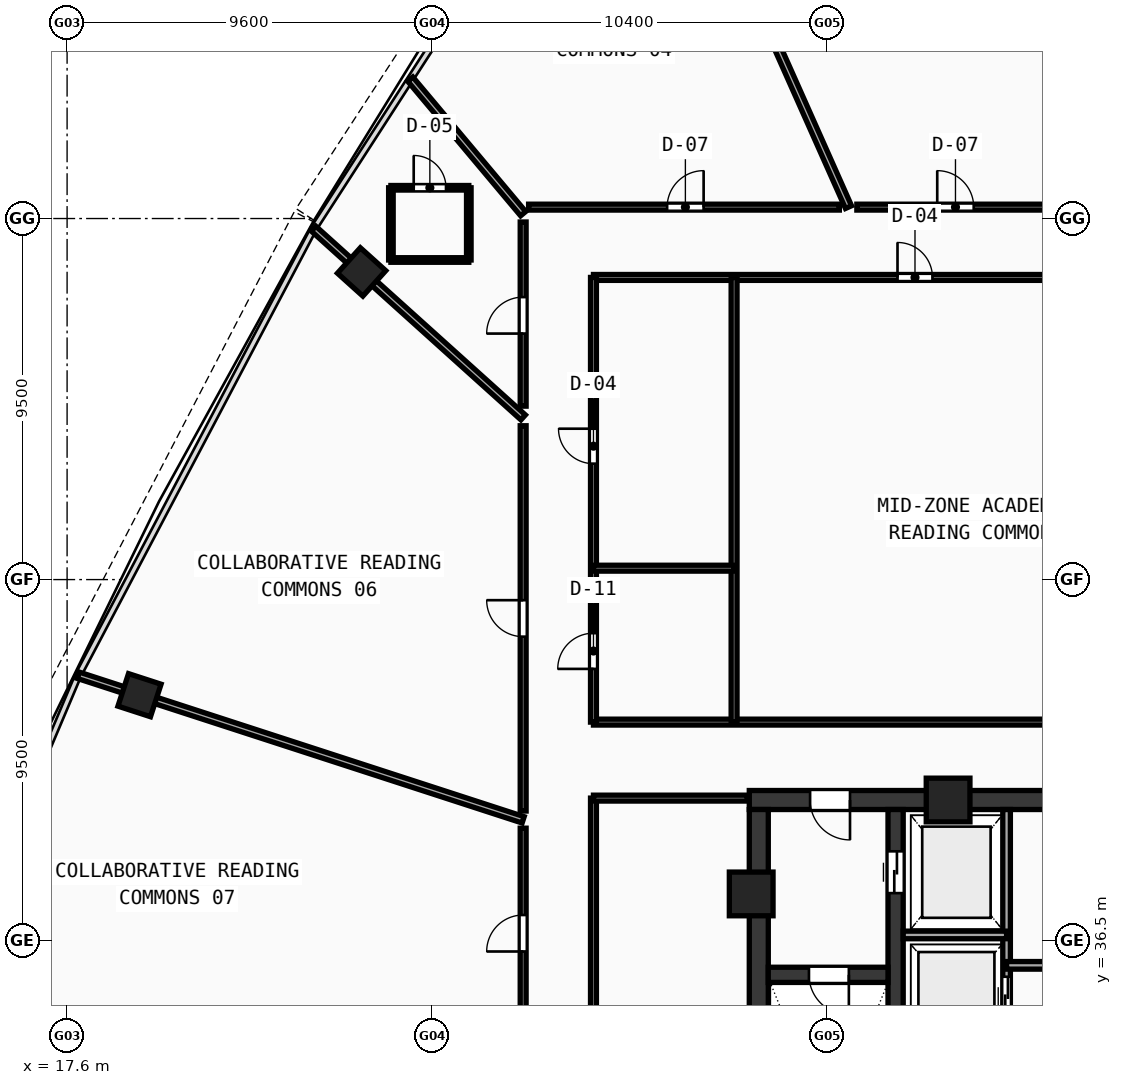
"""IFC4 building model, lengths in metres.
Left out: names, types, materials, properties, quantities, classifications, styles, units other than length and angle.
Written with IfcOpenShell. Run it as: python <this file> out.ifc"""

import sys

from ifc_helpers import new_model, si_unit, direction, frame, frame_2d, origin, origin_with_axes, origin_2d, place, context, subcontext, project, spatial, rectangle, hollow_rectangle, extrude, source, transform, mapped, element, fill, save


model = new_model("IFC4")
c1 = context("Model", 3, precision=1e-05, world=origin(), true_north=direction((0.0, 1.0)))
c2 = subcontext(c1, "Body", "Model", "MODEL_VIEW")
j1 = project(units=[si_unit("LENGTHUNIT", "METRE"), si_unit("PLANEANGLEUNIT", "RADIAN")], contexts=[c1])
p1 = place(None, origin())
s1 = spatial("IfcSite", under=j1, at=p1, CompositionType="ELEMENT")
p2 = place(p1, origin())
s2 = spatial("IfcBuilding", under=s1, at=p2, CompositionType="ELEMENT")
p3 = place(p2, frame((0.0, 0.0, 203.76)))
s3 = spatial("IfcBuildingStorey", under=s2, at=p3, CompositionType="ELEMENT", Elevation=203.76)
p4 = place(p3, frame((35.55, 40.2, 0.0), z_axis=(0.0, 0.0, 1.0), x_axis=(1.0, 0.0, 0.0)))
e1 = element("IfcWall", 1, at=p4, inside=s3, PredefinedType="SHEAR", context=c2, shape_type="SweptSolid", body=[
    extrude(rectangle(XDim=11.25, YDim=0.5, at=frame_2d((5.625, 0.0))), origin(), (0.0, 0.0, 1.0), 3.54),
])
p5 = place(p4, frame((1.6, 0.0, 0.0)))
e2 = element("IfcOpeningElement", 2, at=p5, cuts=e1, PredefinedType="OPENING", context=c2, shape_type="SweptSolid", body=[
    extrude(rectangle(XDim=1.05, YDim=2.1, at=frame_2d((0.525, 1.05))), frame((0.0, 0.26, 0.0), z_axis=(0.0, -1.0, 0.0), x_axis=(1.0, 0.0, 0.0)), (0.0, 0.0, 1.0), 0.52),
])
p6 = place(p3, frame((35.8, 27.75, 0.0), z_axis=(0.0, 0.0, 1.0), x_axis=(0.0, 1.0, 0.0)))
e3 = element("IfcWall", 3, at=p6, inside=s3, PredefinedType="SHEAR", context=c2, shape_type="SweptSolid", body=[
    extrude(rectangle(XDim=12.2, YDim=0.5, at=frame_2d((6.1, 0.0))), origin(), (0.0, 0.0, 1.0), 3.54),
])
p7 = place(p3, frame((39.4, 27.75, 0.0), z_axis=(0.0, 0.0, 1.0), x_axis=(0.0, 1.0, 0.0)))
e4 = element("IfcWall", 4, at=p7, inside=s3, PredefinedType="SHEAR", context=c2, shape_type="SweptSolid", body=[
    extrude(rectangle(XDim=12.2, YDim=0.4, at=frame_2d((6.1, 0.0))), origin(), (0.0, 0.0, 1.0), 3.54),
])
p8 = place(p7, frame((10.0, 0.0, 0.0)))
e5 = element("IfcOpeningElement", 5, at=p8, cuts=e4, PredefinedType="OPENING", context=c2, shape_type="SweptSolid", body=[
    extrude(rectangle(XDim=1.1, YDim=2.1, at=frame_2d((0.55, 1.05))), frame((0.0, 0.21, 0.0), z_axis=(0.0, -1.0, 0.0), x_axis=(1.0, 0.0, 0.0)), (0.0, 0.0, 1.0), 0.42),
])
p9 = place(p3, frame((36.05, 35.6, 0.0), z_axis=(0.0, 0.0, 1.0), x_axis=(1.0, 0.0, 0.0)))
e6 = element("IfcWall", 6, at=p9, inside=s3, PredefinedType="SHEAR", context=c2, shape_type="SweptSolid", body=[
    extrude(rectangle(XDim=3.15, YDim=0.4, at=frame_2d((1.575, 0.0))), origin(), (0.0, 0.0, 1.0), 3.54),
])
p10 = place(p9, frame((1.07, 0.0, 0.0)))
e7 = element("IfcOpeningElement", 7, at=p10, cuts=e6, PredefinedType="OPENING", context=c2, shape_type="SweptSolid", body=[
    extrude(rectangle(XDim=1.05, YDim=2.1, at=frame_2d((0.525, 1.05))), frame((0.0, 0.21, 0.0), z_axis=(0.0, -1.0, 0.0), x_axis=(1.0, 0.0, 0.0)), (0.0, 0.0, 1.0), 0.42),
])
m1 = source(origin(), c2, "Body", "SweptSolid", [
    extrude(hollow_rectangle(XDim=1.15, YDim=1.15, WallThickness=0.048, at=origin_2d()), origin(), (0.0, 0.0, 1.0), 3.8),
])
for number, where, z_axis, x_axis in (
    (8, (40.781, 40.2, -0.26), (0.0, 0.0, 1.0), (1.0, 0.0, 0.0)),
    (9, (35.6, 37.729, -0.26), (0.0, 0.0, 1.0), (1.0, 0.0, 0.0)),
):
    element("IfcColumn", number, at=place(p3, frame(where, z_axis=z_axis, x_axis=x_axis)), inside=s3, PredefinedType="COLUMN", context=c2, shape_type="MappedRepresentation", body=[
        mapped(m1, transform((0.0, 0.0, 0.0), scale=1.0)),
    ])
m2 = source(origin(), c2, "Body", "SweptSolid", [
    extrude(hollow_rectangle(XDim=0.9, YDim=0.9, WallThickness=0.036, at=origin_2d()), origin(), (0.0, 0.0, 1.0), 3.8),
])
for number, where, z_axis, x_axis in (
    (10, (25.349, 54.095, -0.26), (0.0, 0.0, 1.0), (-0.669, -0.743, 0.0)),
    (11, (19.505, 42.958, -0.26), (0.0, 0.0, 1.0), (-0.309, -0.951, 0.0)),
):
    element("IfcColumn", number, at=place(p3, frame(where, z_axis=z_axis, x_axis=x_axis)), inside=s3, PredefinedType="COLUMN", context=c2, shape_type="MappedRepresentation", body=[
        mapped(m2, transform((0.0, 0.0, 0.0), scale=1.0)),
    ])
p11 = place(p3, frame((42.32, 33.5, 0.0), z_axis=(0.0, 0.0, 1.0), x_axis=(0.0, 1.0, 0.0)))
e12 = element("IfcWall", 12, at=p11, inside=s3, PredefinedType="SOLIDWALL", context=c2, shape_type="SweptSolid", body=[
    extrude(rectangle(XDim=6.45, YDim=0.2, at=frame_2d((3.225, 0.0))), origin(), (0.0, 0.0, 1.0), 3.54),
])
p12 = place(p11, frame((1.0, 0.0, 0.0)))
e13 = element("IfcOpeningElement", 13, at=p12, cuts=e12, PredefinedType="OPENING", context=c2, shape_type="SweptSolid", body=[
    extrude(rectangle(XDim=1.05, YDim=2.1, at=frame_2d((0.525, 1.05))), frame((0.0, 0.11, 0.0), z_axis=(0.0, -1.0, 0.0), x_axis=(1.0, 0.0, 0.0)), (0.0, 0.0, 1.0), 0.22),
])
p13 = place(p3, frame((39.6, 36.65, 0.0), z_axis=(0.0, 0.0, 1.0), x_axis=(1.0, 0.0, 0.0)))
e14 = element("IfcWall", 14, at=p13, inside=s3, PredefinedType="SOLIDWALL", context=c2, shape_type="SweptSolid", body=[
    extrude(rectangle(XDim=2.72, YDim=0.2, at=frame_2d((1.36, 0.0))), origin(), (0.0, 0.0, 1.0), 3.54),
])
p14 = place(p3, frame((42.32, 35.85, 0.0), z_axis=(0.0, 0.0, 1.0), x_axis=(1.0, 0.0, 0.0)))
e15 = element("IfcWall", 15, at=p14, inside=s3, PredefinedType="SOLIDWALL", context=c2, shape_type="SweptSolid", body=[
    extrude(rectangle(XDim=4.73, YDim=0.2, at=frame_2d((2.365, 0.0))), origin(), (0.0, 0.0, 1.0), 3.54),
])
p15 = place(p14, frame((1.8, 0.0, 0.0)))
e16 = element("IfcOpeningElement", 16, at=p15, cuts=e15, PredefinedType="OPENING", context=c2, shape_type="SweptSolid", body=[
    extrude(rectangle(XDim=0.9, YDim=2.1, at=frame_2d((0.45, 1.05))), frame((0.0, 0.11, 0.0), z_axis=(0.0, -1.0, 0.0), x_axis=(1.0, 0.0, 0.0)), (0.0, 0.0, 1.0), 0.22),
])
p16 = place(p3, frame((31.45, 42.25, 0.0), z_axis=(0.0, 0.0, 1.0), x_axis=(1.0, 0.0, 0.0)))
e17 = element("IfcWall", 17, at=p16, inside=s3, PredefinedType="PARTITIONING", context=c2, shape_type="SweptSolid", body=[
    extrude(rectangle(XDim=33.1, YDim=0.155, at=frame_2d((16.55, 0.0))), origin(), (0.0, 0.0, 1.0), 2.89),
])
p17 = place(p3, frame((31.45, 53.95, 0.0), z_axis=(0.0, 0.0, 1.0), x_axis=(1.0, 0.0, 0.0)))
e18 = element("IfcWall", 18, at=p17, inside=s3, PredefinedType="PARTITIONING", context=c2, shape_type="SweptSolid", body=[
    extrude(rectangle(XDim=33.1, YDim=0.155, at=frame_2d((16.55, 0.0))), origin(), (0.0, 0.0, 1.0), 2.89),
])
p18 = place(p17, frame((8.0, 0.0, 0.0)))
e19 = element("IfcOpeningElement", 19, at=p18, cuts=e18, PredefinedType="OPENING", context=c2, shape_type="SweptSolid", body=[
    extrude(rectangle(XDim=0.92, YDim=2.1, at=frame_2d((0.46, 1.05))), frame((0.0, 0.087, 0.0), z_axis=(0.0, -1.0, 0.0), x_axis=(1.0, 0.0, 0.0)), (0.0, 0.0, 1.0), 0.175),
])
p19 = place(p17, frame((19.85, 0.0, 0.0)))
e20 = element("IfcOpeningElement", 20, at=p19, cuts=e18, PredefinedType="OPENING", context=c2, shape_type="SweptSolid", body=[
    extrude(rectangle(XDim=0.92, YDim=2.1, at=frame_2d((0.46, 1.05))), frame((0.0, 0.087, 0.0), z_axis=(0.0, -1.0, 0.0), x_axis=(1.0, 0.0, 0.0)), (0.0, 0.0, 1.0), 0.175),
])
p20 = place(p3, frame((31.45, 42.25, 0.0), z_axis=(0.0, 0.0, 1.0), x_axis=(0.0, 1.0, 0.0)))
e21 = element("IfcWall", 21, at=p20, inside=s3, PredefinedType="PARTITIONING", context=c2, shape_type="SweptSolid", body=[
    extrude(rectangle(XDim=11.7, YDim=0.155, at=frame_2d((5.85, 0.0))), origin(), (0.0, 0.0, 1.0), 2.89),
])
p21 = place(p20, frame((1.4, 0.0, 0.0)))
e22 = element("IfcOpeningElement", 22, at=p21, cuts=e21, PredefinedType="OPENING", context=c2, shape_type="SweptSolid", body=[
    extrude(rectangle(XDim=0.94, YDim=2.1, at=frame_2d((0.47, 1.05))), frame((0.0, 0.087, 0.0), z_axis=(0.0, -1.0, 0.0), x_axis=(1.0, 0.0, 0.0)), (0.0, 0.0, 1.0), 0.175),
])
p22 = place(p20, frame((6.8, 0.0, 0.0)))
e23 = element("IfcOpeningElement", 23, at=p22, cuts=e21, PredefinedType="OPENING", context=c2, shape_type="SweptSolid", body=[
    extrude(rectangle(XDim=0.92, YDim=2.1, at=frame_2d((0.46, 1.05))), frame((0.0, 0.087, 0.0), z_axis=(0.0, -1.0, 0.0), x_axis=(1.0, 0.0, 0.0)), (0.0, 0.0, 1.0), 0.175),
])
p23 = place(p3, frame((35.15, 42.25, 0.0), z_axis=(0.0, 0.0, 1.0), x_axis=(0.0, 1.0, 0.0)))
e24 = element("IfcWall", 24, at=p23, inside=s3, PredefinedType="PARTITIONING", context=c2, shape_type="SweptSolid", body=[
    extrude(rectangle(XDim=11.7, YDim=0.155, at=frame_2d((5.85, 0.0))), origin(), (0.0, 0.0, 1.0), 2.89),
])
p24 = place(p3, frame((31.45, 46.3, 0.0), z_axis=(0.0, 0.0, 1.0), x_axis=(1.0, 0.0, 0.0)))
e25 = element("IfcWall", 25, at=p24, inside=s3, PredefinedType="PARTITIONING", context=c2, shape_type="SweptSolid", body=[
    extrude(rectangle(XDim=3.7, YDim=0.155, at=frame_2d((1.85, 0.0))), origin(), (0.0, 0.0, 1.0), 2.89),
])
p25 = place(p3, frame((31.45, 23.65, 0.0), z_axis=(0.0, 0.0, 1.0), x_axis=(0.0, 1.0, 0.0)))
e26 = element("IfcWall", 26, at=p25, inside=s3, PredefinedType="PARTITIONING", context=c2, shape_type="SweptSolid", body=[
    extrude(rectangle(XDim=16.6, YDim=0.155, at=frame_2d((8.3, 0.0))), origin(), (0.0, 0.0, 1.0), 2.89),
])
p26 = place(p25, frame((7.5, 0.0, 0.0)))
e27 = element("IfcOpeningElement", 27, at=p26, cuts=e26, PredefinedType="OPENING", context=c2, shape_type="SweptSolid", body=[
    extrude(rectangle(XDim=0.9, YDim=2.08, at=frame_2d((0.45, 1.04))), frame((0.0, 0.087, 0.0), z_axis=(0.0, -1.0, 0.0), x_axis=(1.0, 0.0, 0.0)), (0.0, 0.0, 1.0), 0.175),
])
p27 = place(p3, frame((31.45, 40.25, 0.0), z_axis=(0.0, 0.0, 1.0), x_axis=(1.0, 0.0, 0.0)))
e28 = element("IfcWall", 28, at=p27, inside=s3, PredefinedType="PARTITIONING", context=c2, shape_type="SweptSolid", body=[
    extrude(rectangle(XDim=4.05, YDim=0.155, at=frame_2d((2.025, 0.0))), origin(), (0.0, 0.0, 1.0), 3.54),
])
p28 = place(p3, frame((38.16, 55.8, 0.0), z_axis=(0.0, 0.0, 1.0), x_axis=(-0.406733161266, 0.913547007836, 0.0)))
e29 = element("IfcWall", 29, at=p28, inside=s3, PredefinedType="PARTITIONING", context=c2, shape_type="SweptSolid", body=[
    extrude(rectangle(XDim=13.749, YDim=0.175, at=frame_2d((6.875, 0.0))), origin(), (0.0, 0.0, 1.0), 2.89),
])
p29 = place(p3, frame((29.6, 55.628, 0.0), z_axis=(0.0, 0.0, 1.0), x_axis=(-0.642810353623, 0.766025358115, 0.0)))
e30 = element("IfcWall", 30, at=p29, inside=s3, PredefinedType="PARTITIONING", context=c2, shape_type="SweptSolid", body=[
    extrude(rectangle(XDim=4.621, YDim=0.175, at=frame_2d((2.31, 0.0))), origin(), (0.0, 0.0, 1.0), 2.89),
])
p30 = place(p3, frame((29.6, 50.267, 0.0), z_axis=(0.0, 0.0, 1.0), x_axis=(-0.743143583897, 0.669131985271, 0.0)))
e31 = element("IfcWall", 31, at=p30, inside=s3, PredefinedType="PARTITIONING", context=c2, shape_type="SweptSolid", body=[
    extrude(rectangle(XDim=7.419, YDim=0.175, at=frame_2d((3.709, 0.0))), origin(), (0.0, 0.0, 1.0), 2.89),
])
p31 = place(p3, frame((29.6, 39.678, 0.0), z_axis=(0.0, 0.0, 1.0), x_axis=(-0.951057676857, 0.309013422511, 0.0)))
e32 = element("IfcWall", 32, at=p31, inside=s3, PredefinedType="PARTITIONING", context=c2, shape_type="SweptSolid", body=[
    extrude(rectangle(XDim=12.31, YDim=0.175, at=frame_2d((6.155, 0.0))), origin(), (0.0, 0.0, 1.0), 2.89),
])
p32 = place(p3, frame((29.6, 33.92, 0.0), z_axis=(0.0, 0.0, 1.0), x_axis=(0.0, 1.0, 0.0)))
e33 = element("IfcWall", 33, at=p32, inside=s3, PredefinedType="PARTITIONING", context=c2, shape_type="SweptSolid", body=[
    extrude(rectangle(XDim=5.539, YDim=0.155, at=frame_2d((2.77, 0.0))), origin(), (0.0, 0.0, 1.0), 3.14),
])
p33 = place(p32, frame((2.294, 0.0, 0.0)))
e34 = element("IfcOpeningElement", 34, at=p33, cuts=e33, PredefinedType="OPENING", context=c2, shape_type="SweptSolid", body=[
    extrude(rectangle(XDim=0.96, YDim=2.12, at=frame_2d((0.48, 1.06))), frame((0.0, 0.087, 0.0), z_axis=(0.0, -1.0, 0.0), x_axis=(1.0, 0.0, 0.0)), (0.0, 0.0, 1.0), 0.175),
])
p34 = place(p3, frame((29.6, 39.91, 0.0), z_axis=(0.0, 0.0, 1.0), x_axis=(0.0, 1.0, 0.0)))
e35 = element("IfcWall", 35, at=p34, inside=s3, PredefinedType="PARTITIONING", context=c2, shape_type="SweptSolid", body=[
    extrude(rectangle(XDim=10.138, YDim=0.155, at=frame_2d((5.069, 0.0))), origin(), (0.0, 0.0, 1.0), 2.89),
])
p35 = place(p34, frame((4.588, 0.0, 0.0)))
e36 = element("IfcOpeningElement", 36, at=p35, cuts=e35, PredefinedType="OPENING", context=c2, shape_type="SweptSolid", body=[
    extrude(rectangle(XDim=0.96, YDim=2.12, at=frame_2d((0.48, 1.06))), frame((0.0, 0.087, 0.0), z_axis=(0.0, -1.0, 0.0), x_axis=(1.0, 0.0, 0.0)), (0.0, 0.0, 1.0), 0.175),
])
p36 = place(p3, frame((29.6, 50.563, 0.0), z_axis=(0.0, 0.0, 1.0), x_axis=(0.0, 1.0, 0.0)))
e37 = element("IfcWall", 37, at=p36, inside=s3, PredefinedType="PARTITIONING", context=c2, shape_type="SweptSolid", body=[
    extrude(rectangle(XDim=4.845, YDim=0.155, at=frame_2d((2.422, 0.0))), origin(), (0.0, 0.0, 1.0), 3.54),
])
p37 = place(p36, frame((1.909, 0.0, 0.0)))
e38 = element("IfcOpeningElement", 38, at=p37, cuts=e37, PredefinedType="OPENING", context=c2, shape_type="SweptSolid", body=[
    extrude(rectangle(XDim=0.96, YDim=2.12, at=frame_2d((0.48, 1.06))), frame((0.0, 0.087, 0.0), z_axis=(0.0, -1.0, 0.0), x_axis=(1.0, 0.0, 0.0)), (0.0, 0.0, 1.0), 0.175),
])
p38 = place(p3, frame((29.743, 55.8, 0.0), z_axis=(0.0, 0.0, 1.0), x_axis=(1.0, 0.0, 0.0)))
e39 = element("IfcWall", 39, at=p38, inside=s3, PredefinedType="PARTITIONING", context=c2, shape_type="SweptSolid", body=[
    extrude(rectangle(XDim=8.177, YDim=0.155, at=frame_2d((4.088, 0.0))), origin(), (0.0, 0.0, 1.0), 3.14),
])
p39 = place(p38, frame((3.646, 0.0, 0.0)))
e40 = element("IfcOpeningElement", 40, at=p39, cuts=e39, PredefinedType="OPENING", context=c2, shape_type="SweptSolid", body=[
    extrude(rectangle(XDim=0.96, YDim=2.12, at=frame_2d((0.48, 1.06))), frame((0.0, 0.087, 0.0), z_axis=(0.0, -1.0, 0.0), x_axis=(1.0, 0.0, 0.0)), (0.0, 0.0, 1.0), 0.175),
])
p40 = place(p3, frame((38.38, 55.8, 0.0), z_axis=(0.0, 0.0, 1.0), x_axis=(1.0, 0.0, 0.0)))
e41 = element("IfcWall", 41, at=p40, inside=s3, PredefinedType="PARTITIONING", context=c2, shape_type="SweptSolid", body=[
    extrude(rectangle(XDim=5.329, YDim=0.155, at=frame_2d((2.665, 0.0))), origin(), (0.0, 0.0, 1.0), 2.89),
])
p41 = place(p40, frame((2.115, 0.0, 0.0)))
e42 = element("IfcOpeningElement", 42, at=p41, cuts=e41, PredefinedType="OPENING", context=c2, shape_type="SweptSolid", body=[
    extrude(rectangle(XDim=0.96, YDim=2.12, at=frame_2d((0.48, 1.06))), frame((0.0, 0.087, 0.0), z_axis=(0.0, -1.0, 0.0), x_axis=(1.0, 0.0, 0.0)), (0.0, 0.0, 1.0), 0.175),
])
p42 = place(p3, frame((26.12, 54.409, 0.0), z_axis=(0.0, 0.0, 1.0), x_axis=(1.0, 0.0, 0.0)))
e43 = element("IfcWall", 43, at=p42, inside=s3, PredefinedType="PARTITIONING", context=c2, shape_type="SweptSolid", body=[
    extrude(rectangle(XDim=2.05, YDim=0.12, at=frame_2d((1.025, 0.0))), origin(), (0.0, 0.0, 1.0), 3.54),
])
p43 = place(p3, frame((28.17, 54.409, 0.0), z_axis=(0.0, 0.0, 1.0), x_axis=(0.0, 1.0, 0.0)))
e44 = element("IfcWall", 44, at=p43, inside=s3, PredefinedType="PARTITIONING", context=c2, shape_type="SweptSolid", body=[
    extrude(rectangle(XDim=1.9, YDim=0.12, at=frame_2d((0.95, 0.0))), origin(), (0.0, 0.0, 1.0), 3.54),
])
p44 = place(p3, frame((28.17, 56.309, 0.0), z_axis=(0.0, 0.0, 1.0), x_axis=(-1.0, 0.0, 0.0)))
e45 = element("IfcWall", 45, at=p44, inside=s3, PredefinedType="PARTITIONING", context=c2, shape_type="SweptSolid", body=[
    extrude(rectangle(XDim=2.05, YDim=0.12, at=frame_2d((1.025, 0.0))), origin(), (0.0, 0.0, 1.0), 2.89),
])
p45 = place(p44, frame((0.6, 0.0, 0.0)))
e46 = element("IfcOpeningElement", 46, at=p45, cuts=e45, PredefinedType="OPENING", context=c2, shape_type="SweptSolid", body=[
    extrude(rectangle(XDim=0.85, YDim=2.1, at=frame_2d((0.425, 1.05))), frame((0.0, 0.07, 0.0), z_axis=(0.0, -1.0, 0.0), x_axis=(1.0, 0.0, 0.0)), (0.0, 0.0, 1.0), 0.14),
])
p46 = place(p3, frame((26.12, 56.309, 0.0), z_axis=(0.0, 0.0, 1.0), x_axis=(0.0, -1.0, 0.0)))
e47 = element("IfcWall", 47, at=p46, inside=s3, PredefinedType="PARTITIONING", context=c2, shape_type="SweptSolid", body=[
    extrude(rectangle(XDim=1.9, YDim=0.12, at=frame_2d((0.95, 0.0))), origin(), (0.0, 0.0, 1.0), 2.89),
])
m3 = source(origin(), c2, "Body", "SweptSolid", [
    extrude(rectangle(XDim=1.05, YDim=2.1, at=frame_2d((0.525, 1.05))), frame((0.0, 0.025, 0.0), z_axis=(0.0, -1.0, 0.0), x_axis=(1.0, 0.0, 0.0)), (0.0, 0.0, 1.0), 0.05),
])
p47 = place(p10, frame((1.05, 0.0, 0.0), z_axis=(0.0, 0.0, 1.0), x_axis=(-1.0, 0.0, 0.0)))
e48 = element("IfcDoor", 48, at=p47, inside=s3, OperationType="SINGLE_SWING_LEFT", PredefinedType="DOOR", context=c2, shape_type="MappedRepresentation", body=[
    mapped(m3, transform((0.0, 0.0, 0.0), scale=1.0)),
])
fill(e7, e48)
p48 = place(p5, frame((1.05, 0.0, 0.0), z_axis=(0.0, 0.0, 1.0), x_axis=(-1.0, 0.0, 0.0)))
e49 = element("IfcDoor", 49, at=p48, inside=s3, OperationType="SINGLE_SWING_LEFT", PredefinedType="DOOR", context=c2, shape_type="MappedRepresentation", body=[
    mapped(m3, transform((0.0, 0.0, 0.0), scale=1.0)),
])
fill(e2, e49)
m4 = source(origin(), c2, "Body", "SweptSolid", [
    extrude(rectangle(XDim=1.1, YDim=2.1, at=frame_2d((0.55, 1.05))), frame((0.0, 0.025, 0.0), z_axis=(0.0, -1.0, 0.0), x_axis=(1.0, 0.0, 0.0)), (0.0, 0.0, 1.0), 0.05),
])
p49 = place(p8, frame((1.1, 0.0, 0.0), z_axis=(0.0, 0.0, 1.0), x_axis=(-1.0, 0.0, 0.0)))
e50 = element("IfcDoor", 50, at=p49, inside=s3, OperationType="DOUBLE_DOOR_SLIDING", PredefinedType="DOOR", context=c2, shape_type="MappedRepresentation", body=[
    mapped(m4, transform((0.0, 0.0, 0.0), scale=1.0)),
])
fill(e5, e50)
p50 = place(p12, origin_with_axes())
e51 = element("IfcDoor", 51, at=p50, inside=s3, OperationType="DOUBLE_DOOR_SLIDING", PredefinedType="DOOR", context=c2, shape_type="MappedRepresentation", body=[
    mapped(m3, transform((0.0, 0.0, 0.0), scale=1.0)),
])
fill(e13, e51)
m5 = source(origin(), c2, "Body", "SweptSolid", [
    extrude(rectangle(XDim=0.94, YDim=2.1, at=frame_2d((0.47, 1.05))), frame((0.0, 0.025, 0.0), z_axis=(0.0, -1.0, 0.0), x_axis=(1.0, 0.0, 0.0)), (0.0, 0.0, 1.0), 0.05),
])
p51 = place(p21, origin_with_axes())
e52 = element("IfcDoor", 52, at=p51, inside=s3, OperationType="SINGLE_SWING_LEFT", PredefinedType="DOOR", context=c2, shape_type="MappedRepresentation", body=[
    mapped(m5, transform((0.0, 0.0, 0.0), scale=1.0)),
])
fill(e22, e52)
m6 = source(origin(), c2, "Body", "SweptSolid", [
    extrude(rectangle(XDim=0.92, YDim=2.1, at=frame_2d((0.46, 1.05))), frame((0.0, 0.025, 0.0), z_axis=(0.0, -1.0, 0.0), x_axis=(1.0, 0.0, 0.0)), (0.0, 0.0, 1.0), 0.05),
])
p52 = place(p22, origin_with_axes())
e53 = element("IfcDoor", 53, at=p52, inside=s3, OperationType="SINGLE_SWING_RIGHT", PredefinedType="DOOR", context=c2, shape_type="MappedRepresentation", body=[
    mapped(m6, transform((0.0, 0.0, 0.0), scale=1.0)),
])
fill(e23, e53)
p53 = place(p18, origin_with_axes())
e54 = element("IfcDoor", 54, at=p53, inside=s3, OperationType="SINGLE_SWING_LEFT", PredefinedType="DOOR", context=c2, shape_type="MappedRepresentation", body=[
    mapped(m6, transform((0.0, 0.0, 0.0), scale=1.0)),
])
fill(e19, e54)
m7 = source(origin(), c2, "Body", "SweptSolid", [
    extrude(rectangle(XDim=0.96, YDim=2.12, at=frame_2d((0.48, 1.06))), frame((0.0, 0.025, 0.0), z_axis=(0.0, -1.0, 0.0), x_axis=(1.0, 0.0, 0.0)), (0.0, 0.0, 1.0), 0.05),
])
p54 = place(p41, origin_with_axes())
e55 = element("IfcDoor", 55, at=p54, inside=s3, OperationType="SINGLE_SWING_LEFT", PredefinedType="DOOR", context=c2, shape_type="MappedRepresentation", body=[
    mapped(m7, transform((0.0, 0.0, 0.0), scale=1.0)),
])
fill(e42, e55)
p55 = place(p39, origin_with_axes())
e56 = element("IfcDoor", 56, at=p55, inside=s3, OperationType="SINGLE_SWING_RIGHT", PredefinedType="DOOR", context=c2, shape_type="MappedRepresentation", body=[
    mapped(m7, transform((0.0, 0.0, 0.0), scale=1.0)),
])
fill(e40, e56)
p56 = place(p37, origin_with_axes())
e57 = element("IfcDoor", 57, at=p56, inside=s3, OperationType="SINGLE_SWING_LEFT", PredefinedType="DOOR", context=c2, shape_type="MappedRepresentation", body=[
    mapped(m7, transform((0.0, 0.0, 0.0), scale=1.0)),
])
fill(e38, e57)
m8 = source(origin(), c2, "Body", "SweptSolid", [
    extrude(rectangle(XDim=0.85, YDim=2.1, at=frame_2d((0.425, 1.05))), frame((0.0, 0.025, 0.0), z_axis=(0.0, -1.0, 0.0), x_axis=(1.0, 0.0, 0.0)), (0.0, 0.0, 1.0), 0.05),
])
p57 = place(p45, frame((0.85, 0.0, 0.0), z_axis=(0.0, 0.0, 1.0), x_axis=(-1.0, 0.0, 0.0)))
e58 = element("IfcDoor", 58, at=p57, inside=s3, OperationType="SINGLE_SWING_LEFT", PredefinedType="DOOR", context=c2, shape_type="MappedRepresentation", body=[
    mapped(m8, transform((0.0, 0.0, 0.0), scale=1.0)),
])
fill(e46, e58)
p58 = place(p35, origin_with_axes())
e59 = element("IfcDoor", 59, at=p58, inside=s3, OperationType="SINGLE_SWING_RIGHT", PredefinedType="DOOR", context=c2, shape_type="MappedRepresentation", body=[
    mapped(m7, transform((0.0, 0.0, 0.0), scale=1.0)),
])
fill(e36, e59)
p59 = place(p33, origin_with_axes())
e60 = element("IfcDoor", 60, at=p59, inside=s3, OperationType="SINGLE_SWING_LEFT", PredefinedType="DOOR", context=c2, shape_type="MappedRepresentation", body=[
    mapped(m7, transform((0.0, 0.0, 0.0), scale=1.0)),
])
fill(e34, e60)
save(model, sys.argv[1])
